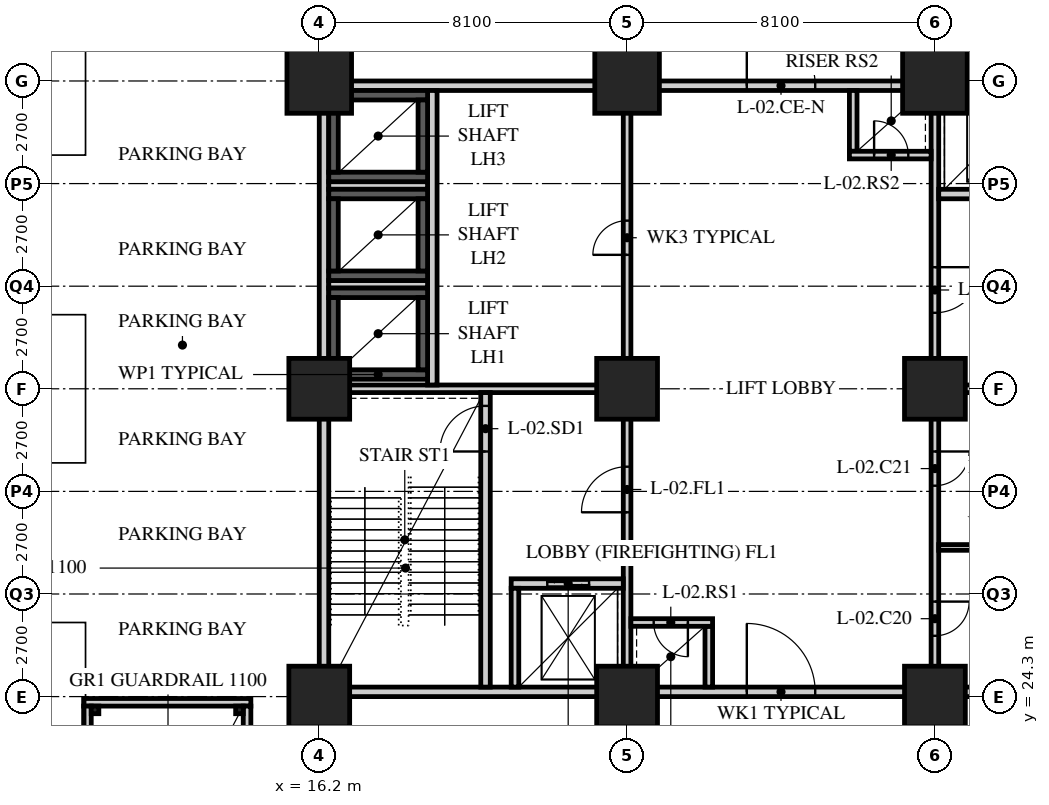
"""IFC4 building model, lengths in metres.
Left out: names, types, materials, properties, quantities, classifications, styles, units other than length and angle.
Written with IfcOpenShell. Run it as: python <this file> out.ifc"""

import sys

from ifc_helpers import new_model, si_unit, direction, frame, frame_2d, origin, origin_2d, place, context, subcontext, project, spatial, rectangle, hollow_rectangle, extrude, element, fill, save


model = new_model("IFC4")
c1 = context("Model", 3, precision=1e-05, world=origin(), true_north=direction((0.0, 1.0)))
c2 = subcontext(c1, "Body", "Model", "MODEL_VIEW")
j1 = project(units=[si_unit("LENGTHUNIT", "METRE"), si_unit("PLANEANGLEUNIT", "RADIAN")], contexts=[c1])
p1 = place(None, origin())
s1 = spatial("IfcSite", under=j1, at=p1, CompositionType="ELEMENT")
p2 = place(p1, origin())
s2 = spatial("IfcBuilding", under=s1, at=p2, CompositionType="ELEMENT")
p3 = place(p2, frame((0.0, 0.0, -8.4)))
s3 = spatial("IfcBuildingStorey", under=s2, at=p3, CompositionType="ELEMENT", Elevation=-8.4)
for number, where, z_axis, x_axis in (
    (1, (16.2, 24.3, 0.0), (0.0, 0.0, 1.0), (1.0, 0.0, 0.0)),
    (2, (16.2, 32.4, 0.0), (0.0, 0.0, 1.0), (1.0, 0.0, 0.0)),
):
    element("IfcColumn", number, at=place(p3, frame(where, z_axis=z_axis, x_axis=x_axis)), inside=s3, PredefinedType="COLUMN", context=c2, shape_type="SweptSolid", body=[
        extrude(hollow_rectangle(XDim=1.6, YDim=1.6, WallThickness=0.15, at=origin_2d()), origin(), (0.0, 0.0, 1.0), 4.2),
    ])
p4 = place(p3, frame((16.2, 40.5, 0.0), z_axis=(0.0, 0.0, 1.0), x_axis=(1.0, 0.0, 0.0)))
e3 = element("IfcColumn", 3, at=p4, inside=s3, PredefinedType="COLUMN", context=c2, shape_type="SweptSolid", body=[
    extrude(hollow_rectangle(XDim=1.7, YDim=1.7, WallThickness=0.16, at=origin_2d()), origin(), (0.0, 0.0, 1.0), 4.2),
])
for number, where, z_axis, x_axis in (
    (4, (24.3, 24.3, 0.0), (0.0, 0.0, 1.0), (1.0, 0.0, 0.0)),
    (5, (24.3, 32.4, 0.0), (0.0, 0.0, 1.0), (1.0, 0.0, 0.0)),
):
    element("IfcColumn", number, at=place(p3, frame(where, z_axis=z_axis, x_axis=x_axis)), inside=s3, PredefinedType="COLUMN", context=c2, shape_type="SweptSolid", body=[
        extrude(hollow_rectangle(XDim=1.6, YDim=1.6, WallThickness=0.15, at=origin_2d()), origin(), (0.0, 0.0, 1.0), 4.2),
    ])
p5 = place(p3, frame((24.3, 40.5, 0.0), z_axis=(0.0, 0.0, 1.0), x_axis=(1.0, 0.0, 0.0)))
e6 = element("IfcColumn", 6, at=p5, inside=s3, PredefinedType="COLUMN", context=c2, shape_type="SweptSolid", body=[
    extrude(hollow_rectangle(XDim=1.7, YDim=1.7, WallThickness=0.16, at=origin_2d()), origin(), (0.0, 0.0, 1.0), 4.2),
])
for number, where, z_axis, x_axis in (
    (7, (32.4, 24.3, 0.0), (0.0, 0.0, 1.0), (1.0, 0.0, 0.0)),
    (8, (32.4, 32.4, 0.0), (0.0, 0.0, 1.0), (1.0, 0.0, 0.0)),
):
    element("IfcColumn", number, at=place(p3, frame(where, z_axis=z_axis, x_axis=x_axis)), inside=s3, PredefinedType="COLUMN", context=c2, shape_type="SweptSolid", body=[
        extrude(hollow_rectangle(XDim=1.6, YDim=1.6, WallThickness=0.15, at=origin_2d()), origin(), (0.0, 0.0, 1.0), 4.2),
    ])
p6 = place(p3, frame((32.4, 40.5, 0.0), z_axis=(0.0, 0.0, 1.0), x_axis=(1.0, 0.0, 0.0)))
e9 = element("IfcColumn", 9, at=p6, inside=s3, PredefinedType="COLUMN", context=c2, shape_type="SweptSolid", body=[
    extrude(hollow_rectangle(XDim=1.7, YDim=1.7, WallThickness=0.16, at=origin_2d()), origin(), (0.0, 0.0, 1.0), 4.2),
])
p7 = place(p3, frame((16.2, 24.425, 0.0), z_axis=(0.0, 0.0, 1.0), x_axis=(1.0, 0.0, 0.0)))
e10 = element("IfcWall", 10, at=p7, inside=s3, PredefinedType="SOLIDWALL", context=c2, shape_type="SweptSolid", body=[
    extrude(rectangle(XDim=24.3, YDim=0.25, at=frame_2d((12.15, 0.0))), origin(), (0.0, 0.0, 1.0), 2.95),
])
p8 = place(p7, frame((11.25, 0.0, 0.0)))
e11 = element("IfcOpeningElement", 11, at=p8, cuts=e10, PredefinedType="OPENING", context=c2, shape_type="SweptSolid", body=[
    extrude(rectangle(XDim=1.8, YDim=2.4, at=frame_2d((0.9, 1.2))), frame((0.0, 0.135, 0.0), z_axis=(0.0, -1.0, 0.0), x_axis=(1.0, 0.0, 0.0)), (0.0, 0.0, 1.0), 0.27),
])
p9 = place(p3, frame((16.2, 40.375, 0.0), z_axis=(0.0, 0.0, 1.0), x_axis=(1.0, 0.0, 0.0)))
e12 = element("IfcWall", 12, at=p9, inside=s3, PredefinedType="SOLIDWALL", context=c2, shape_type="SweptSolid", body=[
    extrude(rectangle(XDim=24.3, YDim=0.25, at=frame_2d((12.15, 0.0))), origin(), (0.0, 0.0, 1.0), 2.95),
])
p10 = place(p9, frame((11.25, 0.0, 0.0)))
e13 = element("IfcOpeningElement", 13, at=p10, cuts=e12, PredefinedType="OPENING", context=c2, shape_type="SweptSolid", body=[
    extrude(rectangle(XDim=1.8, YDim=2.4, at=frame_2d((0.9, 1.2))), frame((0.0, 0.135, 0.0), z_axis=(0.0, -1.0, 0.0), x_axis=(1.0, 0.0, 0.0)), (0.0, 0.0, 1.0), 0.27),
])
p11 = place(p3, frame((16.325, 24.55, 0.0), z_axis=(0.0, 0.0, 1.0), x_axis=(0.0, 1.0, 0.0)))
e14 = element("IfcWall", 14, at=p11, inside=s3, PredefinedType="SOLIDWALL", context=c2, shape_type="SweptSolid", body=[
    extrude(rectangle(XDim=15.7, YDim=0.25, at=frame_2d((7.85, 0.0))), origin(), (0.0, 0.0, 1.0), 2.95),
])
p12 = place(p3, frame((16.45, 32.4, 0.0), z_axis=(0.0, 0.0, 1.0), x_axis=(1.0, 0.0, 0.0)))
e15 = element("IfcWall", 15, at=p12, inside=s3, PredefinedType="SOLIDWALL", context=c2, shape_type="SweptSolid", body=[
    extrude(rectangle(XDim=7.95, YDim=0.2, at=frame_2d((3.975, 0.0))), origin(), (0.0, 0.0, 1.0), 2.95),
])
p13 = place(p3, frame((24.3, 24.55, 0.0), z_axis=(0.0, 0.0, 1.0), x_axis=(0.0, 1.0, 0.0)))
e16 = element("IfcWall", 16, at=p13, inside=s3, PredefinedType="SOLIDWALL", context=c2, shape_type="SweptSolid", body=[
    extrude(rectangle(XDim=7.75, YDim=0.2, at=frame_2d((3.875, 0.0))), origin(), (0.0, 0.0, 1.0), 2.95),
])
p14 = place(p13, frame((4.6, 0.0, 0.0)))
e17 = element("IfcOpeningElement", 17, at=p14, cuts=e16, PredefinedType="OPENING", context=c2, shape_type="SweptSolid", body=[
    extrude(rectangle(XDim=1.2, YDim=2.1, at=frame_2d((0.6, 1.05))), frame((0.0, 0.11, 0.0), z_axis=(0.0, -1.0, 0.0), x_axis=(1.0, 0.0, 0.0)), (0.0, 0.0, 1.0), 0.22),
])
p15 = place(p3, frame((20.575, 24.55, 0.0), z_axis=(0.0, 0.0, 1.0), x_axis=(0.0, 1.0, 0.0)))
e18 = element("IfcWall", 18, at=p15, inside=s3, PredefinedType="SOLIDWALL", context=c2, shape_type="SweptSolid", body=[
    extrude(rectangle(XDim=7.75, YDim=0.25, at=frame_2d((3.875, 0.0))), origin(), (0.0, 0.0, 1.0), 3.95),
])
p16 = place(p15, frame((6.2, 0.0, 0.0)))
e19 = element("IfcOpeningElement", 19, at=p16, cuts=e18, PredefinedType="OPENING", context=c2, shape_type="SweptSolid", body=[
    extrude(rectangle(XDim=1.2, YDim=2.1, at=frame_2d((0.6, 1.05))), frame((0.0, 0.135, 0.0), z_axis=(0.0, -1.0, 0.0), x_axis=(1.0, 0.0, 0.0)), (0.0, 0.0, 1.0), 0.27),
])
p17 = place(p3, frame((21.25, 27.275, 0.0), z_axis=(0.0, 0.0, 1.0), x_axis=(1.0, 0.0, 0.0)))
e20 = element("IfcWall", 20, at=p17, inside=s3, PredefinedType="SOLIDWALL", context=c2, shape_type="SweptSolid", body=[
    extrude(rectangle(XDim=2.95, YDim=0.25, at=frame_2d((1.475, 0.0))), origin(), (0.0, 0.0, 1.0), 3.95),
])
p18 = place(p17, frame((0.95, 0.0, 0.0)))
e21 = element("IfcOpeningElement", 21, at=p18, cuts=e20, PredefinedType="OPENING", context=c2, shape_type="SweptSolid", body=[
    extrude(rectangle(XDim=1.1, YDim=2.4, at=frame_2d((0.55, 1.2))), frame((0.0, 0.135, 0.0), z_axis=(0.0, -1.0, 0.0), x_axis=(1.0, 0.0, 0.0)), (0.0, 0.0, 1.0), 0.27),
])
p19 = place(p3, frame((21.35, 24.55, 0.0), z_axis=(0.0, 0.0, 1.0), x_axis=(0.0, 1.0, 0.0)))
e22 = element("IfcWall", 22, at=p19, inside=s3, PredefinedType="SOLIDWALL", context=c2, shape_type="SweptSolid", body=[
    extrude(rectangle(XDim=2.6, YDim=0.2, at=frame_2d((1.3, 0.0))), origin(), (0.0, 0.0, 1.0), 3.95),
])
p20 = place(p3, frame((19.175, 32.5, 0.0), z_axis=(0.0, 0.0, 1.0), x_axis=(0.0, 1.0, 0.0)))
e23 = element("IfcWall", 23, at=p20, inside=s3, PredefinedType="SOLIDWALL", context=c2, shape_type="SweptSolid", body=[
    extrude(rectangle(XDim=7.75, YDim=0.25, at=frame_2d((3.875, 0.0))), origin(), (0.0, 0.0, 1.0), 3.95),
])
for number, where, z_axis, x_axis in (
    (24, (16.45, 35.15, 0.0), (0.0, 0.0, 1.0), (1.0, 0.0, 0.0)),
    (25, (16.45, 37.75, 0.0), (0.0, 0.0, 1.0), (1.0, 0.0, 0.0)),
):
    element("IfcWall", number, at=place(p3, frame(where, z_axis=z_axis, x_axis=x_axis)), inside=s3, PredefinedType="SOLIDWALL", context=c2, shape_type="SweptSolid", body=[
        extrude(rectangle(XDim=2.6, YDim=0.2, at=frame_2d((1.3, 0.0))), origin(), (0.0, 0.0, 1.0), 3.95),
    ])
p21 = place(p3, frame((26.45, 24.55, 0.0), z_axis=(0.0, 0.0, 1.0), x_axis=(0.0, 1.0, 0.0)))
e26 = element("IfcWall", 26, at=p21, inside=s3, PredefinedType="SOLIDWALL", context=c2, shape_type="SweptSolid", body=[
    extrude(rectangle(XDim=1.6, YDim=0.2, at=frame_2d((0.8, 0.0))), origin(), (0.0, 0.0, 1.0), 3.95),
])
p22 = place(p3, frame((24.4, 26.25, 0.0), z_axis=(0.0, 0.0, 1.0), x_axis=(1.0, 0.0, 0.0)))
e27 = element("IfcWall", 27, at=p22, inside=s3, PredefinedType="SOLIDWALL", context=c2, shape_type="SweptSolid", body=[
    extrude(rectangle(XDim=2.15, YDim=0.2, at=frame_2d((1.075, 0.0))), origin(), (0.0, 0.0, 1.0), 3.95),
])
p23 = place(p22, frame((0.6, 0.0, 0.0)))
e28 = element("IfcOpeningElement", 28, at=p23, cuts=e27, PredefinedType="OPENING", context=c2, shape_type="SweptSolid", body=[
    extrude(rectangle(XDim=0.9, YDim=2.1, at=frame_2d((0.45, 1.05))), frame((0.0, 0.11, 0.0), z_axis=(0.0, -1.0, 0.0), x_axis=(1.0, 0.0, 0.0)), (0.0, 0.0, 1.0), 0.22),
])
p24 = place(p3, frame((32.3, 32.4, 0.0), z_axis=(0.0, 0.0, 1.0), x_axis=(1.0, 0.0, 0.0)))
e29 = element("IfcWall", 29, at=p24, inside=s3, PredefinedType="SOLIDWALL", context=c2, shape_type="SweptSolid", body=[
    extrude(rectangle(XDim=7.95, YDim=0.2, at=frame_2d((3.975, 0.0))), origin(), (0.0, 0.0, 1.0), 2.95),
])
p25 = place(p3, frame((32.4, 32.5, 0.0), z_axis=(0.0, 0.0, 1.0), x_axis=(0.0, 1.0, 0.0)))
e30 = element("IfcWall", 30, at=p25, inside=s3, PredefinedType="SOLIDWALL", context=c2, shape_type="SweptSolid", body=[
    extrude(rectangle(XDim=7.75, YDim=0.2, at=frame_2d((3.875, 0.0))), origin(), (0.0, 0.0, 1.0), 2.95),
])
p26 = place(p25, frame((1.9, 0.0, 0.0)))
e31 = element("IfcOpeningElement", 31, at=p26, cuts=e30, PredefinedType="OPENING", context=c2, shape_type="SweptSolid", body=[
    extrude(rectangle(XDim=1.2, YDim=2.1, at=frame_2d((0.6, 1.05))), frame((0.0, 0.11, 0.0), z_axis=(0.0, -1.0, 0.0), x_axis=(1.0, 0.0, 0.0)), (0.0, 0.0, 1.0), 0.22),
])
p27 = place(p3, frame((32.5, 37.525, 0.0), z_axis=(0.0, 0.0, 1.0), x_axis=(1.0, 0.0, 0.0)))
e32 = element("IfcWall", 32, at=p27, inside=s3, PredefinedType="SOLIDWALL", context=c2, shape_type="SweptSolid", body=[
    extrude(rectangle(XDim=2.95, YDim=0.25, at=frame_2d((1.475, 0.0))), origin(), (0.0, 0.0, 1.0), 3.95),
])
p28 = place(p27, frame((0.9, 0.0, 0.0)))
e33 = element("IfcOpeningElement", 33, at=p28, cuts=e32, PredefinedType="OPENING", context=c2, shape_type="SweptSolid", body=[
    extrude(rectangle(XDim=1.1, YDim=2.4, at=frame_2d((0.55, 1.2))), frame((0.0, 0.135, 0.0), z_axis=(0.0, -1.0, 0.0), x_axis=(1.0, 0.0, 0.0)), (0.0, 0.0, 1.0), 0.27),
])
p29 = place(p3, frame((30.25, 38.65, 0.0), z_axis=(0.0, 0.0, 1.0), x_axis=(0.0, 1.0, 0.0)))
e34 = element("IfcWall", 34, at=p29, inside=s3, PredefinedType="SOLIDWALL", context=c2, shape_type="SweptSolid", body=[
    extrude(rectangle(XDim=1.6, YDim=0.2, at=frame_2d((0.8, 0.0))), origin(), (0.0, 0.0, 1.0), 3.95),
])
p30 = place(p3, frame((30.15, 38.55, 0.0), z_axis=(0.0, 0.0, 1.0), x_axis=(1.0, 0.0, 0.0)))
e35 = element("IfcWall", 35, at=p30, inside=s3, PredefinedType="SOLIDWALL", context=c2, shape_type="SweptSolid", body=[
    extrude(rectangle(XDim=2.15, YDim=0.2, at=frame_2d((1.075, 0.0))), origin(), (0.0, 0.0, 1.0), 3.95),
])
p31 = place(p30, frame((0.65, 0.0, 0.0)))
e36 = element("IfcOpeningElement", 36, at=p31, cuts=e35, PredefinedType="OPENING", context=c2, shape_type="SweptSolid", body=[
    extrude(rectangle(XDim=0.9, YDim=2.1, at=frame_2d((0.45, 1.05))), frame((0.0, 0.11, 0.0), z_axis=(0.0, -1.0, 0.0), x_axis=(1.0, 0.0, 0.0)), (0.0, 0.0, 1.0), 0.22),
])
p32 = place(p3, frame((24.3, 32.5, 0.0), z_axis=(0.0, 0.0, 1.0), x_axis=(0.0, 1.0, 0.0)))
e37 = element("IfcWall", 37, at=p32, inside=s3, PredefinedType="PARTITIONING", context=c2, shape_type="SweptSolid", body=[
    extrude(rectangle(XDim=7.75, YDim=0.2, at=frame_2d((3.875, 0.0))), origin(), (0.0, 0.0, 1.0), 2.95),
])
p33 = place(p32, frame((3.425, 0.0, 0.0)))
e38 = element("IfcOpeningElement", 38, at=p33, cuts=e37, PredefinedType="OPENING", context=c2, shape_type="SweptSolid", body=[
    extrude(rectangle(XDim=0.9, YDim=2.1, at=frame_2d((0.45, 1.05))), frame((0.0, 0.11, 0.0), z_axis=(0.0, -1.0, 0.0), x_axis=(1.0, 0.0, 0.0)), (0.0, 0.0, 1.0), 0.22),
])
p34 = place(p3, frame((32.4, 24.55, 0.0), z_axis=(0.0, 0.0, 1.0), x_axis=(0.0, 1.0, 0.0)))
e39 = element("IfcWall", 39, at=p34, inside=s3, PredefinedType="PARTITIONING", context=c2, shape_type="SweptSolid", body=[
    extrude(rectangle(XDim=7.75, YDim=0.2, at=frame_2d((3.875, 0.0))), origin(), (0.0, 0.0, 1.0), 2.95),
])
p35 = place(p34, frame((1.35, 0.0, 0.0)))
e40 = element("IfcOpeningElement", 40, at=p35, cuts=e39, PredefinedType="OPENING", context=c2, shape_type="SweptSolid", body=[
    extrude(rectangle(XDim=0.9, YDim=2.1, at=frame_2d((0.45, 1.05))), frame((0.0, 0.11, 0.0), z_axis=(0.0, -1.0, 0.0), x_axis=(1.0, 0.0, 0.0)), (0.0, 0.0, 1.0), 0.22),
])
p36 = place(p34, frame((5.3, 0.0, 0.0)))
e41 = element("IfcOpeningElement", 41, at=p36, cuts=e39, PredefinedType="OPENING", context=c2, shape_type="SweptSolid", body=[
    extrude(rectangle(XDim=0.9, YDim=2.1, at=frame_2d((0.45, 1.05))), frame((0.0, 0.11, 0.0), z_axis=(0.0, -1.0, 0.0), x_axis=(1.0, 0.0, 0.0)), (0.0, 0.0, 1.0), 0.22),
])
p37 = place(p3, frame((32.5, 28.225, 0.0), z_axis=(0.0, 0.0, 1.0), x_axis=(1.0, 0.0, 0.0)))
e42 = element("IfcWall", 42, at=p37, inside=s3, PredefinedType="PARTITIONING", context=c2, shape_type="SweptSolid", body=[
    extrude(rectangle(XDim=4.9, YDim=0.15, at=frame_2d((2.45, 0.0))), origin(), (0.0, 0.0, 1.0), 3.95),
])
p38 = place(p3, frame((10.0, 24.15, 0.0), z_axis=(0.0, 0.0, 1.0), x_axis=(1.0, 0.0, 0.0)))
e43 = element("IfcWall", 43, at=p38, inside=s3, PredefinedType="SOLIDWALL", context=c2, shape_type="SweptSolid", body=[
    extrude(rectangle(XDim=4.4, YDim=0.2, at=frame_2d((2.2, 0.0))), origin(), (0.0, 0.0, 1.0), 3.338),
])
for number, where, z_axis, x_axis in (
    (44, (10.1, 16.45, 0.0), (0.0, 0.0, 1.0), (0.0, 1.0, 0.0)),
    (45, (14.3, 16.45, 0.0), (0.0, 0.0, 1.0), (0.0, 1.0, 0.0)),
):
    element("IfcWall", number, at=place(p3, frame(where, z_axis=z_axis, x_axis=x_axis)), inside=s3, PredefinedType="SOLIDWALL", context=c2, shape_type="SweptSolid", body=[
        extrude(rectangle(XDim=7.6, YDim=0.2, at=frame_2d((3.8, 0.0))), origin(), (0.0, 0.0, 1.0), 3.95),
    ])
for number, where, z_axis, x_axis in (
    (46, (10.3, 23.95, 0.0), (0.0, 0.0, 1.0), (1.0, 0.0, 0.0)),
    (47, (14.1, 23.95, 0.0), (0.0, 0.0, 1.0), (1.0, 0.0, 0.0)),
):
    element("IfcColumn", number, at=place(p3, frame(where, z_axis=z_axis, x_axis=x_axis)), inside=s3, PredefinedType="COLUMN", context=c2, shape_type="SweptSolid", body=[
        extrude(hollow_rectangle(XDim=0.2, YDim=0.2, WallThickness=0.012, at=origin_2d()), origin(), (0.0, 0.0, 1.0), 4.2),
    ])
for number, where, z_axis, x_axis in (
    (48, (16.45, 32.775, -0.4), (0.0, 0.0, 1.0), (1.0, 0.0, 0.0)),
    (49, (16.45, 34.925, -0.4), (0.0, 0.0, 1.0), (1.0, 0.0, 0.0)),
):
    element("IfcWall", number, at=place(p3, frame(where, z_axis=z_axis, x_axis=x_axis)), inside=s3, PredefinedType="SOLIDWALL", context=c2, shape_type="SweptSolid", body=[
        extrude(rectangle(XDim=2.6, YDim=0.25, at=frame_2d((1.3, 0.0))), origin(), (0.0, 0.0, 1.0), 4.6),
    ])
for number, where, z_axis, x_axis in (
    (50, (16.575, 32.9, -0.4), (0.0, 0.0, 1.0), (0.0, 1.0, 0.0)),
    (51, (18.925, 32.9, -0.4), (0.0, 0.0, 1.0), (0.0, 1.0, 0.0)),
):
    element("IfcWall", number, at=place(p3, frame(where, z_axis=z_axis, x_axis=x_axis)), inside=s3, PredefinedType="SOLIDWALL", context=c2, shape_type="SweptSolid", body=[
        extrude(rectangle(XDim=1.9, YDim=0.25, at=frame_2d((0.95, 0.0))), origin(), (0.0, 0.0, 1.0), 4.6),
    ])
for number, where, z_axis, x_axis in (
    (52, (16.45, 35.375, -0.4), (0.0, 0.0, 1.0), (1.0, 0.0, 0.0)),
    (53, (16.45, 37.525, -0.4), (0.0, 0.0, 1.0), (1.0, 0.0, 0.0)),
):
    element("IfcWall", number, at=place(p3, frame(where, z_axis=z_axis, x_axis=x_axis)), inside=s3, PredefinedType="SOLIDWALL", context=c2, shape_type="SweptSolid", body=[
        extrude(rectangle(XDim=2.6, YDim=0.25, at=frame_2d((1.3, 0.0))), origin(), (0.0, 0.0, 1.0), 4.6),
    ])
for number, where, z_axis, x_axis in (
    (54, (16.575, 35.5, -0.4), (0.0, 0.0, 1.0), (0.0, 1.0, 0.0)),
    (55, (18.925, 35.5, -0.4), (0.0, 0.0, 1.0), (0.0, 1.0, 0.0)),
):
    element("IfcWall", number, at=place(p3, frame(where, z_axis=z_axis, x_axis=x_axis)), inside=s3, PredefinedType="SOLIDWALL", context=c2, shape_type="SweptSolid", body=[
        extrude(rectangle(XDim=1.9, YDim=0.25, at=frame_2d((0.95, 0.0))), origin(), (0.0, 0.0, 1.0), 4.6),
    ])
for number, where, z_axis, x_axis in (
    (56, (16.45, 37.975, -0.4), (0.0, 0.0, 1.0), (1.0, 0.0, 0.0)),
    (57, (16.45, 40.125, -0.4), (0.0, 0.0, 1.0), (1.0, 0.0, 0.0)),
):
    element("IfcWall", number, at=place(p3, frame(where, z_axis=z_axis, x_axis=x_axis)), inside=s3, PredefinedType="SOLIDWALL", context=c2, shape_type="SweptSolid", body=[
        extrude(rectangle(XDim=2.6, YDim=0.25, at=frame_2d((1.3, 0.0))), origin(), (0.0, 0.0, 1.0), 4.6),
    ])
for number, where, z_axis, x_axis in (
    (58, (16.575, 38.1, -0.4), (0.0, 0.0, 1.0), (0.0, 1.0, 0.0)),
    (59, (18.925, 38.1, -0.4), (0.0, 0.0, 1.0), (0.0, 1.0, 0.0)),
):
    element("IfcWall", number, at=place(p3, frame(where, z_axis=z_axis, x_axis=x_axis)), inside=s3, PredefinedType="SOLIDWALL", context=c2, shape_type="SweptSolid", body=[
        extrude(rectangle(XDim=1.9, YDim=0.25, at=frame_2d((0.95, 0.0))), origin(), (0.0, 0.0, 1.0), 4.6),
    ])
p39 = place(p33, origin())
e60 = element("IfcDoor", 60, at=p39, inside=s3, OperationType="SINGLE_SWING_LEFT", PredefinedType="DOOR", context=c2, shape_type="SweptSolid", body=[
    extrude(rectangle(XDim=0.9, YDim=2.1, at=frame_2d((0.45, 1.05))), frame((0.0, 0.025, 0.0), z_axis=(0.0, -1.0, 0.0), x_axis=(1.0, 0.0, 0.0)), (0.0, 0.0, 1.0), 0.05),
])
fill(e38, e60)
p40 = place(p35, origin())
e61 = element("IfcDoor", 61, at=p40, inside=s3, OperationType="SINGLE_SWING_LEFT", PredefinedType="DOOR", context=c2, shape_type="SweptSolid", body=[
    extrude(rectangle(XDim=0.9, YDim=2.1, at=frame_2d((0.45, 1.05))), frame((0.0, 0.025, 0.0), z_axis=(0.0, -1.0, 0.0), x_axis=(1.0, 0.0, 0.0)), (0.0, 0.0, 1.0), 0.05),
])
fill(e40, e61)
p41 = place(p36, origin())
e62 = element("IfcDoor", 62, at=p41, inside=s3, OperationType="SINGLE_SWING_LEFT", PredefinedType="DOOR", context=c2, shape_type="SweptSolid", body=[
    extrude(rectangle(XDim=0.9, YDim=2.1, at=frame_2d((0.45, 1.05))), frame((0.0, 0.025, 0.0), z_axis=(0.0, -1.0, 0.0), x_axis=(1.0, 0.0, 0.0)), (0.0, 0.0, 1.0), 0.05),
])
fill(e41, e62)
p42 = place(p16, origin())
e63 = element("IfcDoor", 63, at=p42, inside=s3, OperationType="SINGLE_SWING_LEFT", PredefinedType="DOOR", context=c2, shape_type="SweptSolid", body=[
    extrude(rectangle(XDim=1.2, YDim=2.1, at=frame_2d((0.6, 1.05))), frame((0.0, 0.025, 0.0), z_axis=(0.0, -1.0, 0.0), x_axis=(1.0, 0.0, 0.0)), (0.0, 0.0, 1.0), 0.05),
])
fill(e19, e63)
p43 = place(p14, origin())
e64 = element("IfcDoor", 64, at=p43, inside=s3, OperationType="SINGLE_SWING_LEFT", PredefinedType="DOOR", context=c2, shape_type="SweptSolid", body=[
    extrude(rectangle(XDim=1.2, YDim=2.1, at=frame_2d((0.6, 1.05))), frame((0.0, 0.025, 0.0), z_axis=(0.0, -1.0, 0.0), x_axis=(1.0, 0.0, 0.0)), (0.0, 0.0, 1.0), 0.05),
])
fill(e17, e64)
p44 = place(p23, origin())
e65 = element("IfcDoor", 65, at=p44, inside=s3, OperationType="SINGLE_SWING_LEFT", PredefinedType="DOOR", context=c2, shape_type="SweptSolid", body=[
    extrude(rectangle(XDim=0.9, YDim=2.1, at=frame_2d((0.45, 1.05))), frame((0.0, 0.025, 0.0), z_axis=(0.0, -1.0, 0.0), x_axis=(1.0, 0.0, 0.0)), (0.0, 0.0, 1.0), 0.05),
])
fill(e28, e65)
p45 = place(p26, origin())
e66 = element("IfcDoor", 66, at=p45, inside=s3, OperationType="SINGLE_SWING_LEFT", PredefinedType="DOOR", context=c2, shape_type="SweptSolid", body=[
    extrude(rectangle(XDim=1.2, YDim=2.1, at=frame_2d((0.6, 1.05))), frame((0.0, 0.025, 0.0), z_axis=(0.0, -1.0, 0.0), x_axis=(1.0, 0.0, 0.0)), (0.0, 0.0, 1.0), 0.05),
])
fill(e31, e66)
p46 = place(p31, origin())
e67 = element("IfcDoor", 67, at=p46, inside=s3, OperationType="SINGLE_SWING_LEFT", PredefinedType="DOOR", context=c2, shape_type="SweptSolid", body=[
    extrude(rectangle(XDim=0.9, YDim=2.1, at=frame_2d((0.45, 1.05))), frame((0.0, 0.025, 0.0), z_axis=(0.0, -1.0, 0.0), x_axis=(1.0, 0.0, 0.0)), (0.0, 0.0, 1.0), 0.05),
])
fill(e36, e67)
p47 = place(p18, origin())
e68 = element("IfcDoor", 68, at=p47, inside=s3, OperationType="DOUBLE_DOOR_SLIDING", PredefinedType="DOOR", context=c2, shape_type="SweptSolid", body=[
    extrude(rectangle(XDim=1.1, YDim=2.4, at=frame_2d((0.55, 1.2))), frame((0.0, 0.025, 0.0), z_axis=(0.0, -1.0, 0.0), x_axis=(1.0, 0.0, 0.0)), (0.0, 0.0, 1.0), 0.05),
])
fill(e21, e68)
p48 = place(p8, origin())
e69 = element("IfcDoor", 69, at=p48, inside=s3, OperationType="DOUBLE_DOOR_SINGLE_SWING", PredefinedType="DOOR", context=c2, shape_type="SweptSolid", body=[
    extrude(rectangle(XDim=1.8, YDim=2.4, at=frame_2d((0.9, 1.2))), frame((0.0, 0.025, 0.0), z_axis=(0.0, -1.0, 0.0), x_axis=(1.0, 0.0, 0.0)), (0.0, 0.0, 1.0), 0.05),
])
fill(e11, e69)
p49 = place(p10, origin())
e70 = element("IfcDoor", 70, at=p49, inside=s3, OperationType="DOUBLE_DOOR_SINGLE_SWING", PredefinedType="DOOR", context=c2, shape_type="SweptSolid", body=[
    extrude(rectangle(XDim=1.8, YDim=2.4, at=frame_2d((0.9, 1.2))), frame((0.0, 0.025, 0.0), z_axis=(0.0, -1.0, 0.0), x_axis=(1.0, 0.0, 0.0)), (0.0, 0.0, 1.0), 0.05),
])
fill(e13, e70)
save(model, sys.argv[1])
